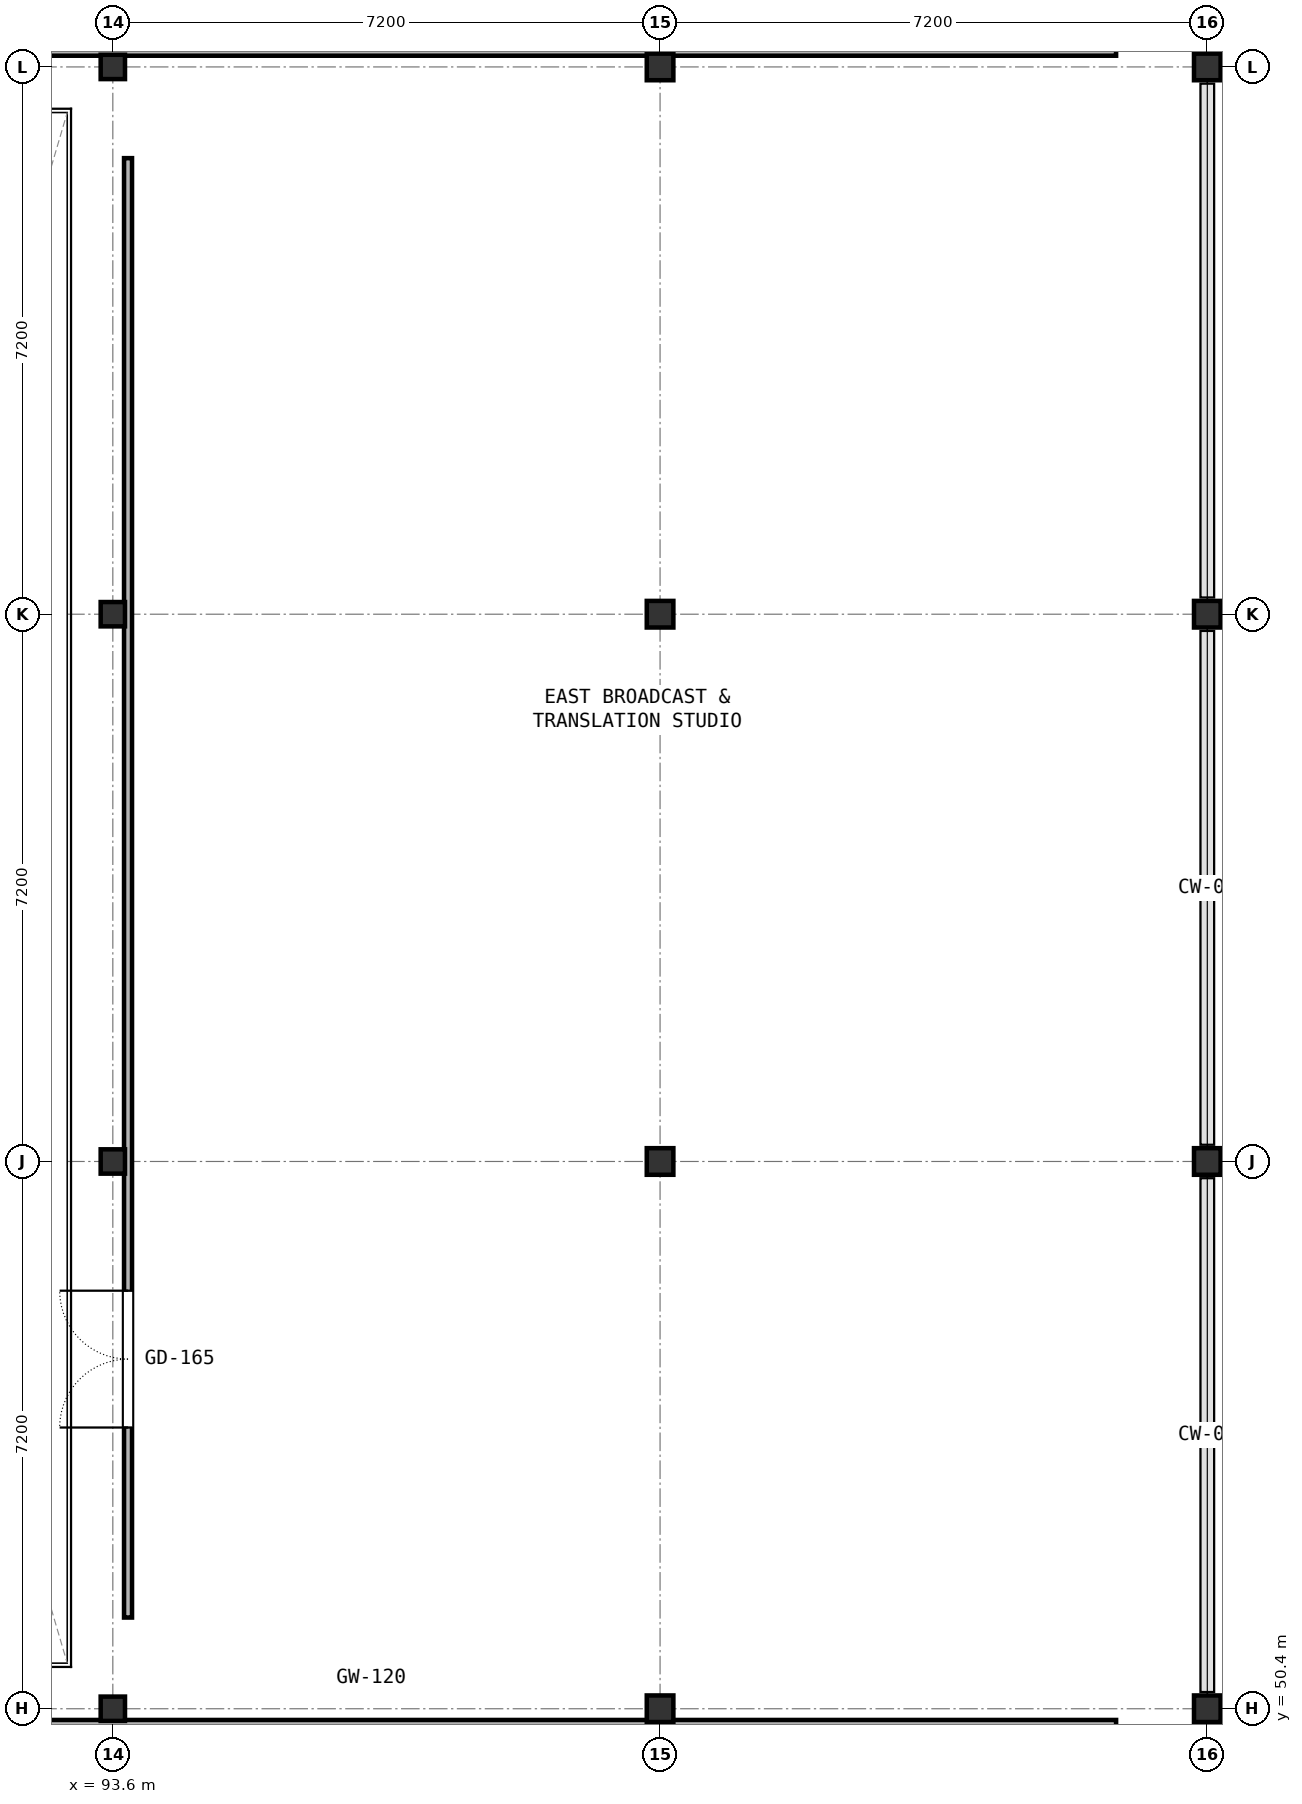
"""IFC4 building model, lengths in metres.
Left out: names, types, materials, properties, quantities, classifications, styles, units other than length and angle.
Written with IfcOpenShell. Run it as: python <this file> out.ifc"""

import sys

from ifc_helpers import new_model, si_unit, direction, frame, frame_2d, origin, origin_2d, place, context, subcontext, project, spatial, rectangle, hollow_rectangle, i_section, extrude, element, fill, save


model = new_model("IFC4")
c1 = context("Model", 3, precision=1e-05, world=origin(), true_north=direction((0.0, 1.0)))
c2 = subcontext(c1, "Body", "Model", "MODEL_VIEW")
j1 = project(units=[si_unit("LENGTHUNIT", "METRE"), si_unit("PLANEANGLEUNIT", "RADIAN")], contexts=[c1])
p1 = place(None, origin())
s1 = spatial("IfcSite", under=j1, at=p1, CompositionType="ELEMENT")
p2 = place(p1, origin())
s2 = spatial("IfcBuilding", under=s1, at=p2, CompositionType="ELEMENT")
p3 = place(p2, frame((0.0, 0.0, 5.4)))
s3 = spatial("IfcBuildingStorey", under=s2, at=p3, CompositionType="ELEMENT", Elevation=5.4)
for number, where, z_axis, x_axis in (
    (1, (93.6, 50.4, 0.0), (0.0, 0.0, 1.0), (1.0, 0.0, 0.0)),
    (2, (93.6, 57.6, 0.0), (0.0, 0.0, 1.0), (1.0, 0.0, 0.0)),
    (3, (93.6, 64.8, 0.0), (0.0, 0.0, 1.0), (1.0, 0.0, 0.0)),
    (4, (93.6, 72.0, 0.0), (0.0, 0.0, 1.0), (1.0, 0.0, 0.0)),
):
    element("IfcColumn", number, at=place(p3, frame(where, z_axis=z_axis, x_axis=x_axis)), inside=s3, PredefinedType="COLUMN", context=c2, shape_type="SweptSolid", body=[
        extrude(hollow_rectangle(XDim=0.32, YDim=0.32, WallThickness=0.012, InnerFilletRadius=0.012, OuterFilletRadius=0.024, at=origin_2d()), origin(), (0.0, 0.0, 1.0), 4.8),
    ])
for number, where, z_axis, x_axis in (
    (5, (100.8, 50.4, 0.0), (0.0, 0.0, 1.0), (1.0, 0.0, 0.0)),
    (6, (100.8, 57.6, 0.0), (0.0, 0.0, 1.0), (1.0, 0.0, 0.0)),
    (7, (100.8, 64.8, 0.0), (0.0, 0.0, 1.0), (1.0, 0.0, 0.0)),
    (8, (100.8, 72.0, 0.0), (0.0, 0.0, 1.0), (1.0, 0.0, 0.0)),
    (9, (108.0, 50.4, 0.0), (0.0, 0.0, 1.0), (1.0, 0.0, 0.0)),
    (10, (108.0, 57.6, 0.0), (0.0, 0.0, 1.0), (1.0, 0.0, 0.0)),
    (11, (108.0, 64.8, 0.0), (0.0, 0.0, 1.0), (1.0, 0.0, 0.0)),
    (12, (108.0, 72.0, 0.0), (0.0, 0.0, 1.0), (1.0, 0.0, 0.0)),
):
    element("IfcColumn", number, at=place(p3, frame(where, z_axis=z_axis, x_axis=x_axis)), inside=s3, PredefinedType="COLUMN", context=c2, shape_type="SweptSolid", body=[
        extrude(i_section(OverallWidth=0.35, OverallDepth=0.35, WebThickness=0.012, FlangeThickness=0.019, FilletRadius=0.02, at=origin_2d()), origin(), (0.0, 0.0, 1.0), 4.8),
    ])
p4 = place(p3, frame((87.2, 50.2, 0.0), z_axis=(0.0, 0.0, 1.0), x_axis=(1.0, 0.0, 0.0)))
e13 = element("IfcWall", 13, at=p4, inside=s3, PredefinedType="PARTITIONING", context=c2, shape_type="SweptSolid", body=[
    extrude(rectangle(XDim=19.6, YDim=0.105, at=frame_2d((9.8, 0.0))), origin(), (0.0, 0.0, 1.0), 3.52),
])
p5 = place(p4, frame((2.5, 0.0, 0.0)))
e14 = element("IfcOpeningElement", 14, at=p5, cuts=e13, PredefinedType="OPENING", context=c2, shape_type="SweptSolid", body=[
    extrude(rectangle(XDim=1.8, YDim=2.2, at=frame_2d((0.9, 1.1))), frame((0.0, 0.062, 0.0), z_axis=(0.0, -1.0, 0.0), x_axis=(1.0, 0.0, 0.0)), (0.0, 0.0, 1.0), 0.125),
])
p6 = place(p3, frame((87.2, 72.2, 0.0), z_axis=(0.0, 0.0, 1.0), x_axis=(1.0, 0.0, 0.0)))
e15 = element("IfcWall", 15, at=p6, inside=s3, PredefinedType="PARTITIONING", context=c2, shape_type="SweptSolid", body=[
    extrude(rectangle(XDim=19.6, YDim=0.105, at=frame_2d((9.8, 0.0))), origin(), (0.0, 0.0, 1.0), 3.52),
])
p7 = place(p6, frame((2.5, 0.0, 0.0)))
e16 = element("IfcOpeningElement", 16, at=p7, cuts=e15, PredefinedType="OPENING", context=c2, shape_type="SweptSolid", body=[
    extrude(rectangle(XDim=1.8, YDim=2.2, at=frame_2d((0.9, 1.1))), frame((0.0, 0.062, 0.0), z_axis=(0.0, -1.0, 0.0), x_axis=(1.0, 0.0, 0.0)), (0.0, 0.0, 1.0), 0.125),
])
p8 = place(p3, frame((93.8, 51.6, 0.0), z_axis=(0.0, 0.0, 1.0), x_axis=(0.0, 1.0, 0.0)))
e17 = element("IfcWall", 17, at=p8, inside=s3, PredefinedType="PARTITIONING", context=c2, shape_type="SweptSolid", body=[
    extrude(rectangle(XDim=19.2, YDim=0.105, at=frame_2d((9.6, 0.0))), origin(), (0.0, 0.0, 1.0), 3.52),
])
p9 = place(p8, frame((2.5, 0.0, 0.0)))
e18 = element("IfcOpeningElement", 18, at=p9, cuts=e17, PredefinedType="OPENING", context=c2, shape_type="SweptSolid", body=[
    extrude(rectangle(XDim=1.8, YDim=2.2, at=frame_2d((0.9, 1.1))), frame((0.0, 0.062, 0.0), z_axis=(0.0, -1.0, 0.0), x_axis=(1.0, 0.0, 0.0)), (0.0, 0.0, 1.0), 0.125),
])
p10 = place(p9, origin())
e19 = element("IfcDoor", 19, at=p10, inside=s3, OperationType="DOUBLE_DOOR_SINGLE_SWING", PredefinedType="DOOR", context=c2, shape_type="SweptSolid", body=[
    extrude(rectangle(XDim=1.8, YDim=2.2, at=frame_2d((0.9, 1.1))), frame((0.0, 0.025, 0.0), z_axis=(0.0, -1.0, 0.0), x_axis=(1.0, 0.0, 0.0)), (0.0, 0.0, 1.0), 0.05),
])
fill(e18, e19)
save(model, sys.argv[1])
